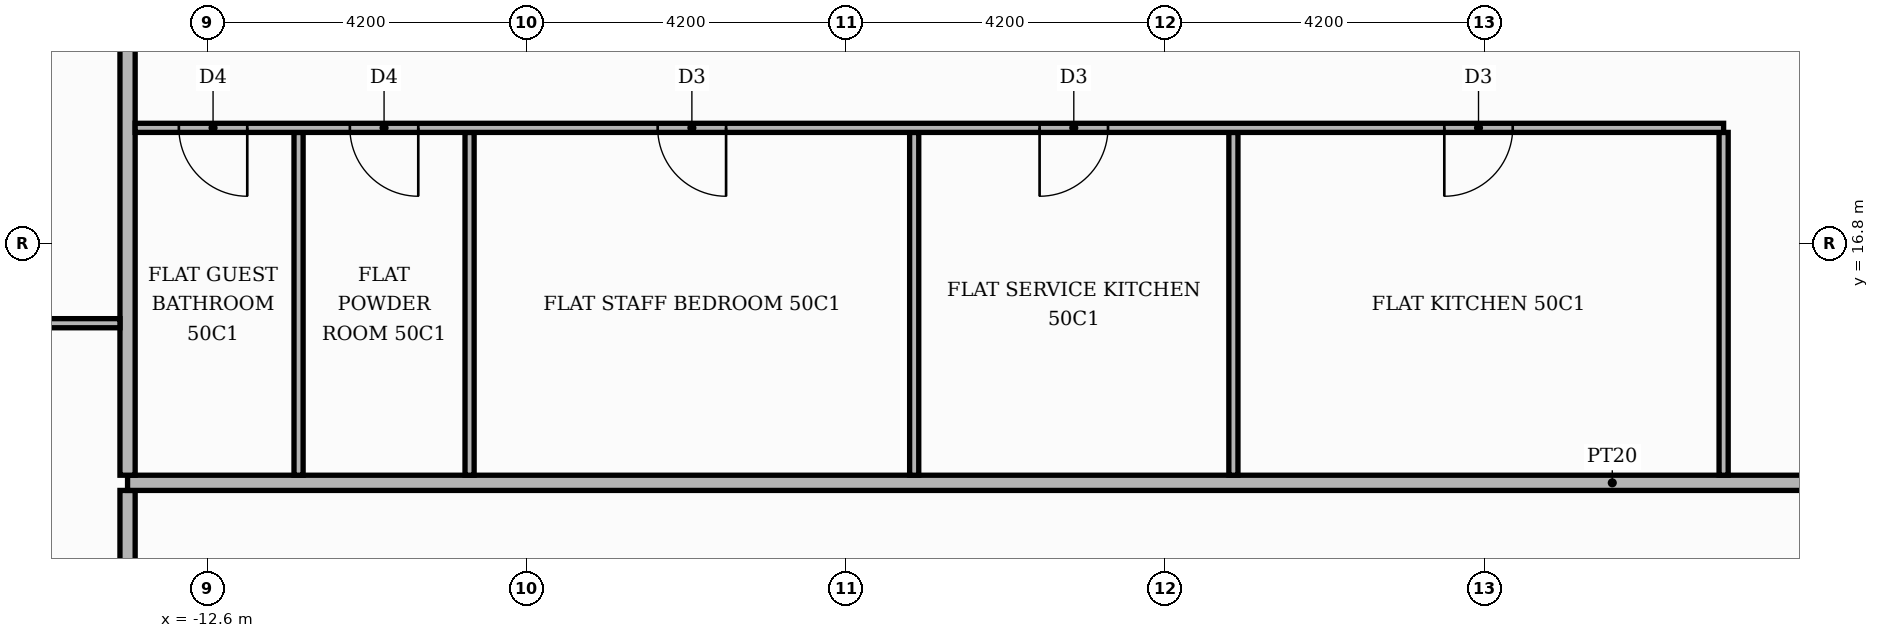
"""IFC4 building model, lengths in metres.
Left out: names, types, materials, properties, quantities, classifications, styles, units other than length and angle.
Written with IfcOpenShell. Run it as: python <this file> out.ifc"""

import sys

from ifc_helpers import new_model, si_unit, direction, frame, frame_2d, origin, place, context, subcontext, project, spatial, rectangle, extrude, element, fill, save


model = new_model("IFC4")
c1 = context("Model", 3, precision=1e-05, world=origin(), true_north=direction((0.0, 1.0)))
c2 = subcontext(c1, "Body", "Model", "MODEL_VIEW")
j1 = project(units=[si_unit("LENGTHUNIT", "METRE"), si_unit("PLANEANGLEUNIT", "RADIAN")], contexts=[c1])
p1 = place(None, origin())
s1 = spatial("IfcSite", under=j1, at=p1, CompositionType="ELEMENT")
p2 = place(p1, origin())
s2 = spatial("IfcBuilding", under=s1, at=p2, CompositionType="ELEMENT")
p3 = place(p2, frame((0.0, 0.0, 211.8)))
s3 = spatial("IfcBuildingStorey", under=s2, at=p3, CompositionType="ELEMENT", Elevation=211.8)
p4 = place(p3, frame((-13.65, 5.35, 0.0), z_axis=(0.0, 0.0, 1.0), x_axis=(0.0, 1.0, 0.0)))
e1 = element("IfcWall", 1, at=p4, inside=s3, PredefinedType="PARTITIONING", context=c2, shape_type="SweptSolid", body=[
    extrude(rectangle(XDim=8.2, YDim=0.2, at=frame_2d((4.1, 0.0))), origin(), (0.0, 0.0, 1.0), 3.48),
])
p5 = place(p4, frame((5.65, 0.0, 0.0)))
e2 = element("IfcOpeningElement", 2, at=p5, cuts=e1, PredefinedType="OPENING", context=c2, shape_type="SweptSolid", body=[
    extrude(rectangle(XDim=1.1, YDim=2.4, at=frame_2d((0.55, 1.2))), frame((0.0, 0.11, 0.0), z_axis=(0.0, -1.0, 0.0), x_axis=(1.0, 0.0, 0.0)), (0.0, 0.0, 1.0), 0.22),
])
p6 = place(p3, frame((-13.65, 13.65, 0.0), z_axis=(0.0, 0.0, 1.0), x_axis=(1.0, 0.0, 0.0)))
e3 = element("IfcWall", 3, at=p6, inside=s3, PredefinedType="PARTITIONING", context=c2, shape_type="SweptSolid", body=[
    extrude(rectangle(XDim=39.07, YDim=0.2, at=frame_2d((19.535, 0.0))), origin(), (0.0, 0.0, 1.0), 3.48),
])
p7 = place(p6, frame((23.6, 0.0, 0.0)))
e4 = element("IfcOpeningElement", 4, at=p7, cuts=e3, PredefinedType="OPENING", context=c2, shape_type="SweptSolid", body=[
    extrude(rectangle(XDim=1.1, YDim=2.4, at=frame_2d((0.55, 1.2))), frame((0.0, 0.11, 0.0), z_axis=(0.0, -1.0, 0.0), x_axis=(1.0, 0.0, 0.0)), (0.0, 0.0, 1.0), 0.22),
])
p8 = place(p3, frame((-13.65, 13.75, 0.0), z_axis=(0.0, 0.0, 1.0), x_axis=(0.0, 1.0, 0.0)))
e5 = element("IfcWall", 5, at=p8, inside=s3, PredefinedType="PARTITIONING", context=c2, shape_type="SweptSolid", body=[
    extrude(rectangle(XDim=11.67, YDim=0.2, at=frame_2d((5.835, 0.0))), origin(), (0.0, 0.0, 1.0), 3.48),
])
for number, where, z_axis, x_axis in (
    (6, (-11.4, 13.75, 0.0), (0.0, 0.0, 1.0), (0.0, 1.0, 0.0)),
    (7, (-9.15, 13.75, 0.0), (0.0, 0.0, 1.0), (0.0, 1.0, 0.0)),
    (8, (-3.3, 13.75, 0.0), (0.0, 0.0, 1.0), (0.0, 1.0, 0.0)),
    (9, (0.9, 13.75, 0.0), (0.0, 0.0, 1.0), (0.0, 1.0, 0.0)),
    (10, (7.35, 13.75, 0.0), (0.0, 0.0, 1.0), (0.0, 1.0, 0.0)),
):
    element("IfcWall", number, at=place(p3, frame(where, z_axis=z_axis, x_axis=x_axis)), inside=s3, PredefinedType="PARTITIONING", context=c2, shape_type="SweptSolid", body=[
        extrude(rectangle(XDim=4.51, YDim=0.12, at=frame_2d((2.255, 0.0))), origin(), (0.0, 0.0, 1.0), 3.48),
    ])
p9 = place(p3, frame((-20.12, 15.75, 0.0), z_axis=(0.0, 0.0, 1.0), x_axis=(1.0, 0.0, 0.0)))
e11 = element("IfcWall", 11, at=p9, inside=s3, PredefinedType="PARTITIONING", context=c2, shape_type="SweptSolid", body=[
    extrude(rectangle(XDim=6.37, YDim=0.12, at=frame_2d((3.185, 0.0))), origin(), (0.0, 0.0, 1.0), 3.48),
])
p10 = place(p9, frame((2.735, 0.0, 0.0)))
e12 = element("IfcOpeningElement", 12, at=p10, cuts=e11, PredefinedType="OPENING", context=c2, shape_type="SweptSolid", body=[
    extrude(rectangle(XDim=1.0, YDim=2.1, at=frame_2d((0.5, 1.05))), frame((0.0, 0.07, 0.0), z_axis=(0.0, -1.0, 0.0), x_axis=(1.0, 0.0, 0.0)), (0.0, 0.0, 1.0), 0.14),
])
p11 = place(p3, frame((-13.55, 18.32, 0.0), z_axis=(0.0, 0.0, 1.0), x_axis=(1.0, 0.0, 0.0)))
e13 = element("IfcWall", 13, at=p11, inside=s3, PredefinedType="PARTITIONING", context=c2, shape_type="SweptSolid", body=[
    extrude(rectangle(XDim=20.9, YDim=0.12, at=frame_2d((10.45, 0.0))), origin(), (0.0, 0.0, 1.0), 3.48),
])
p12 = place(p11, frame((17.225, 0.0, 0.0)))
e14 = element("IfcOpeningElement", 14, at=p12, cuts=e13, PredefinedType="OPENING", context=c2, shape_type="SweptSolid", body=[
    extrude(rectangle(XDim=0.9, YDim=2.1, at=frame_2d((0.45, 1.05))), frame((0.0, 0.07, 0.0), z_axis=(0.0, -1.0, 0.0), x_axis=(1.0, 0.0, 0.0)), (0.0, 0.0, 1.0), 0.14),
])
p13 = place(p11, frame((11.9, 0.0, 0.0)))
e15 = element("IfcOpeningElement", 15, at=p13, cuts=e13, PredefinedType="OPENING", context=c2, shape_type="SweptSolid", body=[
    extrude(rectangle(XDim=0.9, YDim=2.1, at=frame_2d((0.45, 1.05))), frame((0.0, 0.07, 0.0), z_axis=(0.0, -1.0, 0.0), x_axis=(1.0, 0.0, 0.0)), (0.0, 0.0, 1.0), 0.14),
])
p14 = place(p11, frame((6.875, 0.0, 0.0)))
e16 = element("IfcOpeningElement", 16, at=p14, cuts=e13, PredefinedType="OPENING", context=c2, shape_type="SweptSolid", body=[
    extrude(rectangle(XDim=0.9, YDim=2.1, at=frame_2d((0.45, 1.05))), frame((0.0, 0.07, 0.0), z_axis=(0.0, -1.0, 0.0), x_axis=(1.0, 0.0, 0.0)), (0.0, 0.0, 1.0), 0.14),
])
p15 = place(p11, frame((2.825, 0.0, 0.0)))
e17 = element("IfcOpeningElement", 17, at=p15, cuts=e13, PredefinedType="OPENING", context=c2, shape_type="SweptSolid", body=[
    extrude(rectangle(XDim=0.9, YDim=2.1, at=frame_2d((0.45, 1.05))), frame((0.0, 0.07, 0.0), z_axis=(0.0, -1.0, 0.0), x_axis=(1.0, 0.0, 0.0)), (0.0, 0.0, 1.0), 0.14),
])
p16 = place(p11, frame((0.575, 0.0, 0.0)))
e18 = element("IfcOpeningElement", 18, at=p16, cuts=e13, PredefinedType="OPENING", context=c2, shape_type="SweptSolid", body=[
    extrude(rectangle(XDim=0.9, YDim=2.1, at=frame_2d((0.45, 1.05))), frame((0.0, 0.07, 0.0), z_axis=(0.0, -1.0, 0.0), x_axis=(1.0, 0.0, 0.0)), (0.0, 0.0, 1.0), 0.14),
])
p17 = place(p12, frame((0.9, 0.0, 0.0), z_axis=(0.0, 0.0, 1.0), x_axis=(-1.0, 0.0, 0.0)))
e19 = element("IfcDoor", 19, at=p17, inside=s3, OperationType="SINGLE_SWING_LEFT", PredefinedType="DOOR", context=c2, shape_type="SweptSolid", body=[
    extrude(rectangle(XDim=0.9, YDim=2.1, at=frame_2d((0.45, 1.05))), frame((0.0, 0.025, 0.0), z_axis=(0.0, -1.0, 0.0), x_axis=(1.0, 0.0, 0.0)), (0.0, 0.0, 1.0), 0.05),
])
fill(e14, e19)
p18 = place(p13, frame((0.9, 0.0, 0.0), z_axis=(0.0, 0.0, 1.0), x_axis=(-1.0, 0.0, 0.0)))
e20 = element("IfcDoor", 20, at=p18, inside=s3, OperationType="SINGLE_SWING_LEFT", PredefinedType="DOOR", context=c2, shape_type="SweptSolid", body=[
    extrude(rectangle(XDim=0.9, YDim=2.1, at=frame_2d((0.45, 1.05))), frame((0.0, 0.025, 0.0), z_axis=(0.0, -1.0, 0.0), x_axis=(1.0, 0.0, 0.0)), (0.0, 0.0, 1.0), 0.05),
])
fill(e15, e20)
p19 = place(p14, frame((0.9, 0.0, 0.0), z_axis=(0.0, 0.0, 1.0), x_axis=(-1.0, 0.0, 0.0)))
e21 = element("IfcDoor", 21, at=p19, inside=s3, OperationType="SINGLE_SWING_RIGHT", PredefinedType="DOOR", context=c2, shape_type="SweptSolid", body=[
    extrude(rectangle(XDim=0.9, YDim=2.1, at=frame_2d((0.45, 1.05))), frame((0.0, 0.025, 0.0), z_axis=(0.0, -1.0, 0.0), x_axis=(1.0, 0.0, 0.0)), (0.0, 0.0, 1.0), 0.05),
])
fill(e16, e21)
p20 = place(p15, frame((0.9, 0.0, 0.0), z_axis=(0.0, 0.0, 1.0), x_axis=(-1.0, 0.0, 0.0)))
e22 = element("IfcDoor", 22, at=p20, inside=s3, OperationType="SINGLE_SWING_RIGHT", PredefinedType="DOOR", context=c2, shape_type="SweptSolid", body=[
    extrude(rectangle(XDim=0.9, YDim=2.1, at=frame_2d((0.45, 1.05))), frame((0.0, 0.025, 0.0), z_axis=(0.0, -1.0, 0.0), x_axis=(1.0, 0.0, 0.0)), (0.0, 0.0, 1.0), 0.05),
])
fill(e17, e22)
p21 = place(p16, frame((0.9, 0.0, 0.0), z_axis=(0.0, 0.0, 1.0), x_axis=(-1.0, 0.0, 0.0)))
e23 = element("IfcDoor", 23, at=p21, inside=s3, OperationType="SINGLE_SWING_RIGHT", PredefinedType="DOOR", context=c2, shape_type="SweptSolid", body=[
    extrude(rectangle(XDim=0.9, YDim=2.1, at=frame_2d((0.45, 1.05))), frame((0.0, 0.025, 0.0), z_axis=(0.0, -1.0, 0.0), x_axis=(1.0, 0.0, 0.0)), (0.0, 0.0, 1.0), 0.05),
])
fill(e18, e23)
save(model, sys.argv[1])
